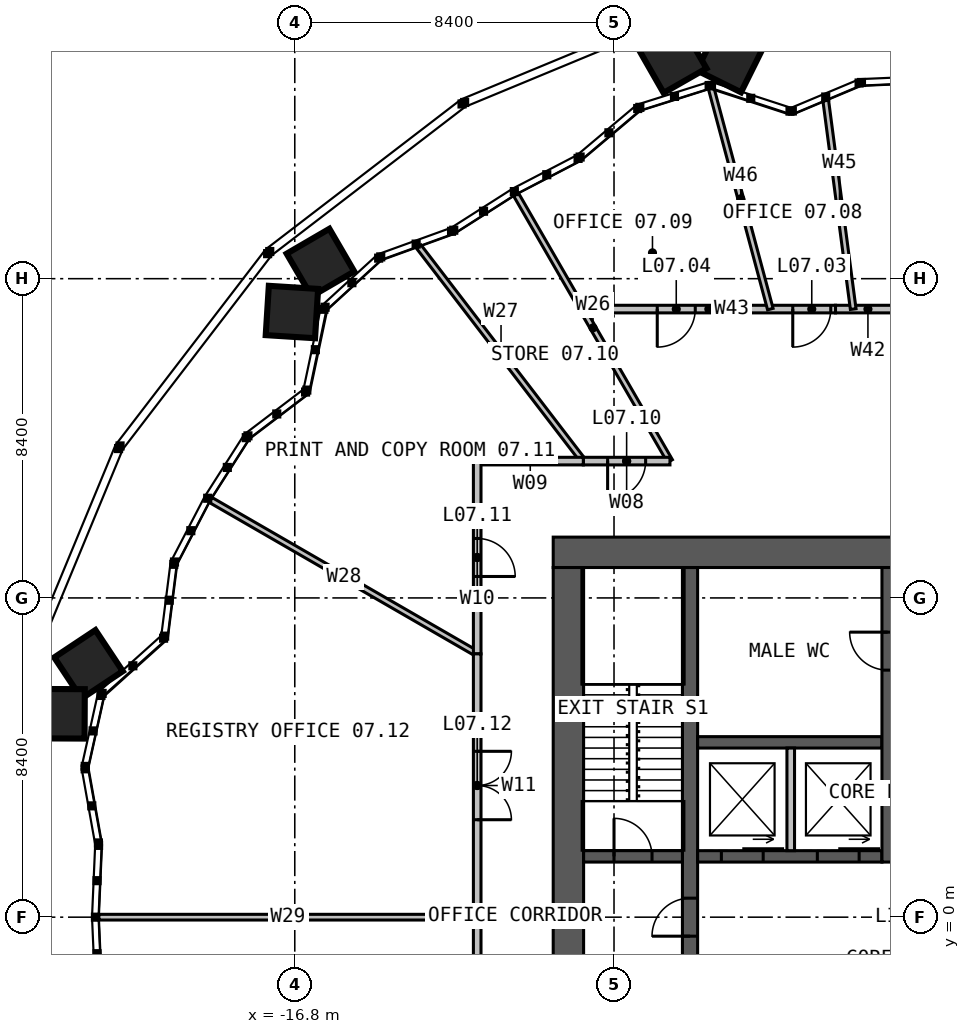
"""IFC4 building model, lengths in metres.
Left out: names, types, materials, properties, quantities, classifications, styles, units other than length and angle.
Written with IfcOpenShell. Run it as: python <this file> out.ifc"""

import sys

from ifc_helpers import new_model, si_unit, direction, frame, frame_2d, origin, place, context, subcontext, project, spatial, rectangle, extrude, element, fill, save


model = new_model("IFC4")
c1 = context("Model", 3, precision=1e-05, world=origin(), true_north=direction((0.0, 1.0)))
c2 = subcontext(c1, "Body", "Model", "MODEL_VIEW")
j1 = project(units=[si_unit("LENGTHUNIT", "METRE"), si_unit("PLANEANGLEUNIT", "RADIAN")], contexts=[c1])
p1 = place(None, origin())
s1 = spatial("IfcSite", under=j1, at=p1, CompositionType="ELEMENT")
p2 = place(p1, origin())
s2 = spatial("IfcBuilding", under=s1, at=p2, CompositionType="ELEMENT")
p3 = place(p2, frame((0.0, 0.0, 33.0)))
s3 = spatial("IfcBuildingStorey", under=s2, at=p3, CompositionType="ELEMENT", Elevation=33.0)
p4 = place(p3, frame((-10.0, 9.6, 0.0), z_axis=(0.0, 0.0, 1.0), x_axis=(1.0, 0.0, 0.0)))
e1 = element("IfcWall", 1, at=p4, inside=s3, PredefinedType="SOLIDWALL", context=c2, shape_type="SweptSolid", body=[
    extrude(rectangle(XDim=20.0, YDim=0.8, at=frame_2d((10.0, 0.0))), origin(), (0.0, 0.0, 1.0), 4.0),
])
p5 = place(p4, frame((9.4, 0.0, 0.0)))
e2 = element("IfcOpeningElement", 2, at=p5, cuts=e1, PredefinedType="OPENING", context=c2, shape_type="SweptSolid", body=[
    extrude(rectangle(XDim=1.2, YDim=2.2, at=frame_2d((0.6, 1.1))), frame((0.0, 0.41, 0.0), z_axis=(0.0, -1.0, 0.0), x_axis=(1.0, 0.0, 0.0)), (0.0, 0.0, 1.0), 0.82),
])
p6 = place(p3, frame((-9.6, 9.2, 0.0), z_axis=(0.0, 0.0, 1.0), x_axis=(0.0, -1.0, 0.0)))
e3 = element("IfcWall", 3, at=p6, inside=s3, PredefinedType="SOLIDWALL", context=c2, shape_type="SweptSolid", body=[
    extrude(rectangle(XDim=18.4, YDim=0.8, at=frame_2d((9.2, 0.0))), origin(), (0.0, 0.0, 1.0), 4.0),
])
p7 = place(p3, frame((-6.4, -9.2, 0.0), z_axis=(0.0, 0.0, 1.0), x_axis=(0.0, 1.0, 0.0)))
e4 = element("IfcWall", 4, at=p7, inside=s3, PredefinedType="SOLIDWALL", context=c2, shape_type="SweptSolid", body=[
    extrude(rectangle(XDim=18.4, YDim=0.4, at=frame_2d((9.2, 0.0))), origin(), (0.0, 0.0, 1.0), 4.0),
])
p8 = place(p7, frame((8.7, 0.0, 0.0)))
e5 = element("IfcOpeningElement", 5, at=p8, cuts=e4, PredefinedType="OPENING", context=c2, shape_type="SweptSolid", body=[
    extrude(rectangle(XDim=1.0, YDim=2.2, at=frame_2d((0.5, 1.1))), frame((0.0, 0.21, 0.0), z_axis=(0.0, -1.0, 0.0), x_axis=(1.0, 0.0, 0.0)), (0.0, 0.0, 1.0), 0.42),
])
p9 = place(p3, frame((-6.2, 1.6, 0.0), z_axis=(0.0, 0.0, 1.0), x_axis=(1.0, 0.0, 0.0)))
e6 = element("IfcWall", 6, at=p9, inside=s3, PredefinedType="SOLIDWALL", context=c2, shape_type="SweptSolid", body=[
    extrude(rectangle(XDim=4.85, YDim=0.3, at=frame_2d((2.425, 0.0))), origin(), (0.0, 0.0, 1.0), 4.0),
])
p10 = place(p9, frame((0.625, 0.0, 0.0)))
e7 = element("IfcOpeningElement", 7, at=p10, cuts=e6, PredefinedType="OPENING", context=c2, shape_type="SweptSolid", body=[
    extrude(rectangle(XDim=1.1, YDim=2.2, at=frame_2d((0.55, 1.1))), frame((0.0, 0.16, 0.0), z_axis=(0.0, -1.0, 0.0), x_axis=(1.0, 0.0, 0.0)), (0.0, 0.0, 1.0), 0.32),
])
p11 = place(p9, frame((3.15, 0.0, 0.0)))
e8 = element("IfcOpeningElement", 8, at=p11, cuts=e6, PredefinedType="OPENING", context=c2, shape_type="SweptSolid", body=[
    extrude(rectangle(XDim=1.1, YDim=2.2, at=frame_2d((0.55, 1.1))), frame((0.0, 0.16, 0.0), z_axis=(0.0, -1.0, 0.0), x_axis=(1.0, 0.0, 0.0)), (0.0, 0.0, 1.0), 0.32),
])
p12 = place(p3, frame((-6.2, 4.6, 0.0), z_axis=(0.0, 0.0, 1.0), x_axis=(1.0, 0.0, 0.0)))
e9 = element("IfcWall", 9, at=p12, inside=s3, PredefinedType="SOLIDWALL", context=c2, shape_type="SweptSolid", body=[
    extrude(rectangle(XDim=4.85, YDim=0.3, at=frame_2d((2.425, 0.0))), origin(), (0.0, 0.0, 1.0), 4.0),
])
p13 = place(p3, frame((-1.2, 1.45, 0.0), z_axis=(0.0, 0.0, 1.0), x_axis=(0.0, 1.0, 0.0)))
e10 = element("IfcWall", 10, at=p13, inside=s3, PredefinedType="SOLIDWALL", context=c2, shape_type="SweptSolid", body=[
    extrude(rectangle(XDim=7.75, YDim=0.3, at=frame_2d((3.875, 0.0))), origin(), (0.0, 0.0, 1.0), 4.0),
])
p14 = place(p13, frame((5.05, 0.0, 0.0)))
e11 = element("IfcOpeningElement", 11, at=p14, cuts=e10, PredefinedType="OPENING", context=c2, shape_type="SweptSolid", body=[
    extrude(rectangle(XDim=1.0, YDim=2.2, at=frame_2d((0.5, 1.1))), frame((0.0, 0.16, 0.0), z_axis=(0.0, -1.0, 0.0), x_axis=(1.0, 0.0, 0.0)), (0.0, 0.0, 1.0), 0.32),
])
p15 = place(p3, frame((-9.2, 1.6, 0.0), z_axis=(0.0, 0.0, 1.0), x_axis=(1.0, 0.0, 0.0)))
e12 = element("IfcWall", 12, at=p15, inside=s3, PredefinedType="SOLIDWALL", context=c2, shape_type="SweptSolid", body=[
    extrude(rectangle(XDim=2.6, YDim=0.3, at=frame_2d((1.3, 0.0))), origin(), (0.0, 0.0, 1.0), 4.0),
])
p16 = place(p15, frame((0.8, 0.0, 0.0)))
e13 = element("IfcOpeningElement", 13, at=p16, cuts=e12, PredefinedType="OPENING", context=c2, shape_type="SweptSolid", body=[
    extrude(rectangle(XDim=1.0, YDim=2.2, at=frame_2d((0.5, 1.1))), frame((0.0, 0.16, 0.0), z_axis=(0.0, -1.0, 0.0), x_axis=(1.0, 0.0, 0.0)), (0.0, 0.0, 1.0), 0.32),
])
p17 = place(p3, frame((-3.75, 1.75, 0.0), z_axis=(0.0, 0.0, 1.0), x_axis=(0.0, 1.0, 0.0)))
e14 = element("IfcWall", 14, at=p17, inside=s3, PredefinedType="SOLIDWALL", context=c2, shape_type="SweptSolid", body=[
    extrude(rectangle(XDim=2.7, YDim=0.2, at=frame_2d((1.35, 0.0))), origin(), (0.0, 0.0, 1.0), 3.75),
])
p18 = place(p3, frame((-6.928, 12.0, 0.0), z_axis=(0.0, 0.0, 1.0), x_axis=(-0.500007814618, 0.866020891966, 0.0)))
e15 = element("IfcWall", 15, at=p18, inside=s3, PredefinedType="PARTITIONING", context=c2, shape_type="SweptSolid", body=[
    extrude(rectangle(XDim=8.097, YDim=0.15, at=frame_2d((4.048, 0.0))), origin(), (0.0, 0.0, 1.0), 2.79),
])
p19 = place(p3, frame((-9.208, 12.0, 0.0), z_axis=(0.0, 0.0, 1.0), x_axis=(-0.608751461293, 0.793360988689, 0.0)))
e16 = element("IfcWall", 16, at=p19, inside=s3, PredefinedType="PARTITIONING", context=c2, shape_type="SweptSolid", body=[
    extrude(rectangle(XDim=7.112, YDim=0.15, at=frame_2d((3.556, 0.0))), origin(), (0.0, 0.0, 1.0), 2.79),
])
p20 = place(p3, frame((-12.0, 6.928, 0.0), z_axis=(0.0, 0.0, 1.0), x_axis=(-0.866020891966, 0.500007814618, 0.0)))
e17 = element("IfcWall", 17, at=p20, inside=s3, PredefinedType="PARTITIONING", context=c2, shape_type="SweptSolid", body=[
    extrude(rectangle(XDim=8.097, YDim=0.15, at=frame_2d((4.048, 0.0))), origin(), (0.0, 0.0, 1.0), 2.79),
])
p21 = place(p3, frame((-12.0, 0.0, 0.0), z_axis=(0.0, 0.0, 1.0), x_axis=(-1.0, 0.0, 0.0)))
e18 = element("IfcWall", 18, at=p21, inside=s3, PredefinedType="PARTITIONING", context=c2, shape_type="SweptSolid", body=[
    extrude(rectangle(XDim=9.954, YDim=0.15, at=frame_2d((4.977, 0.0))), origin(), (0.0, 0.0, 1.0), 2.79),
])
p22 = place(p3, frame((-0.865, 16.0, 0.0), z_axis=(0.0, 0.0, 1.0), x_axis=(-1.0, 0.0, 0.0)))
e19 = element("IfcWall", 19, at=p22, inside=s3, PredefinedType="PARTITIONING", context=c2, shape_type="SweptSolid", body=[
    extrude(rectangle(XDim=1.707, YDim=0.2, at=frame_2d((0.854, 0.0))), origin(), (0.0, 0.0, 1.0), 3.4),
])
p23 = place(p3, frame((-2.572, 16.0, 0.0), z_axis=(0.0, 0.0, 1.0), x_axis=(-1.0, 0.0, 0.0)))
e20 = element("IfcWall", 20, at=p23, inside=s3, PredefinedType="PARTITIONING", context=c2, shape_type="SweptSolid", body=[
    extrude(rectangle(XDim=6.665, YDim=0.2, at=frame_2d((3.333, 0.0))), origin(), (0.0, 0.0, 1.0), 3.8),
])
p24 = place(p23, frame((0.125, 0.0, 0.0)))
e21 = element("IfcOpeningElement", 21, at=p24, cuts=e20, PredefinedType="OPENING", context=c2, shape_type="SweptSolid", body=[
    extrude(rectangle(XDim=1.0, YDim=2.2, at=frame_2d((0.5, 1.1))), frame((0.0, 0.11, 0.0), z_axis=(0.0, -1.0, 0.0), x_axis=(1.0, 0.0, 0.0)), (0.0, 0.0, 1.0), 0.22),
])
p25 = place(p23, frame((3.69, 0.0, 0.0)))
e22 = element("IfcOpeningElement", 22, at=p25, cuts=e20, PredefinedType="OPENING", context=c2, shape_type="SweptSolid", body=[
    extrude(rectangle(XDim=1.0, YDim=2.2, at=frame_2d((0.5, 1.1))), frame((0.0, 0.11, 0.0), z_axis=(0.0, -1.0, 0.0), x_axis=(1.0, 0.0, 0.0)), (0.0, 0.0, 1.0), 0.22),
])
p26 = place(p3, frame((-2.106, 16.0, 0.0), z_axis=(0.0, 0.0, 1.0), x_axis=(-0.130538988536, 0.991443176623, 0.0)))
e23 = element("IfcWall", 23, at=p26, inside=s3, PredefinedType="PARTITIONING", context=c2, shape_type="SweptSolid", body=[
    extrude(rectangle(XDim=5.532, YDim=0.15, at=frame_2d((2.766, 0.0))), origin(), (0.0, 0.0, 1.0), 2.79),
])
p27 = place(p3, frame((-4.287, 16.0, 0.0), z_axis=(0.0, 0.0, 1.0), x_axis=(-0.258838299425, 0.965920666903, 0.0)))
e24 = element("IfcWall", 24, at=p27, inside=s3, PredefinedType="PARTITIONING", context=c2, shape_type="SweptSolid", body=[
    extrude(rectangle(XDim=6.009, YDim=0.15, at=frame_2d((3.005, 0.0))), origin(), (0.0, 0.0, 1.0), 2.79),
])
p28 = place(p3, frame((-6.928, 12.0, 0.0), z_axis=(0.0, 0.0, 1.0), x_axis=(-1.0, 0.0, 0.0)))
e25 = element("IfcWall", 25, at=p28, inside=s3, PredefinedType="PARTITIONING", context=c2, shape_type="SweptSolid", body=[
    extrude(rectangle(XDim=2.28, YDim=0.2, at=frame_2d((1.14, 0.0))), origin(), (0.0, 0.0, 1.0), 3.8),
])
p29 = place(p28, frame((0.64, 0.0, 0.0)))
e26 = element("IfcOpeningElement", 26, at=p29, cuts=e25, PredefinedType="OPENING", context=c2, shape_type="SweptSolid", body=[
    extrude(rectangle(XDim=1.0, YDim=2.2, at=frame_2d((0.5, 1.1))), frame((0.0, 0.11, 0.0), z_axis=(0.0, -1.0, 0.0), x_axis=(1.0, 0.0, 0.0)), (0.0, 0.0, 1.0), 0.22),
])
p30 = place(p3, frame((-9.208, 12.0, 0.0), z_axis=(0.0, 0.0, 1.0), x_axis=(-1.0, 0.0, 0.0)))
e27 = element("IfcWall", 27, at=p30, inside=s3, PredefinedType="PARTITIONING", context=c2, shape_type="SweptSolid", body=[
    extrude(rectangle(XDim=2.792, YDim=0.2, at=frame_2d((1.396, 0.0))), origin(), (0.0, 0.0, 1.0), 3.8),
])
p31 = place(p3, frame((-12.0, 12.0, 0.0), z_axis=(0.0, 0.0, 1.0), x_axis=(0.0, -1.0, 0.0)))
e28 = element("IfcWall", 28, at=p31, inside=s3, PredefinedType="PARTITIONING", context=c2, shape_type="SweptSolid", body=[
    extrude(rectangle(XDim=5.072, YDim=0.2, at=frame_2d((2.536, 0.0))), origin(), (0.0, 0.0, 1.0), 3.8),
])
p32 = place(p31, frame((2.036, 0.0, 0.0)))
e29 = element("IfcOpeningElement", 29, at=p32, cuts=e28, PredefinedType="OPENING", context=c2, shape_type="SweptSolid", body=[
    extrude(rectangle(XDim=1.0, YDim=2.2, at=frame_2d((0.5, 1.1))), frame((0.0, 0.11, 0.0), z_axis=(0.0, -1.0, 0.0), x_axis=(1.0, 0.0, 0.0)), (0.0, 0.0, 1.0), 0.22),
])
p33 = place(p3, frame((-12.0, 6.928, 0.0), z_axis=(0.0, 0.0, 1.0), x_axis=(0.0, -1.0, 0.0)))
e30 = element("IfcWall", 30, at=p33, inside=s3, PredefinedType="PARTITIONING", context=c2, shape_type="SweptSolid", body=[
    extrude(rectangle(XDim=6.928, YDim=0.2, at=frame_2d((3.464, 0.0))), origin(), (0.0, 0.0, 1.0), 3.8),
])
p34 = place(p33, frame((2.564, 0.0, 0.0)))
e31 = element("IfcOpeningElement", 31, at=p34, cuts=e30, PredefinedType="OPENING", context=c2, shape_type="SweptSolid", body=[
    extrude(rectangle(XDim=1.8, YDim=2.2, at=frame_2d((0.9, 1.1))), frame((0.0, 0.11, 0.0), z_axis=(0.0, -1.0, 0.0), x_axis=(1.0, 0.0, 0.0)), (0.0, 0.0, 1.0), 0.22),
])
p35 = place(p3, frame((-12.0, 0.0, 0.0), z_axis=(0.0, 0.0, 1.0), x_axis=(0.0, -1.0, 0.0)))
e32 = element("IfcWall", 32, at=p35, inside=s3, PredefinedType="PARTITIONING", context=c2, shape_type="SweptSolid", body=[
    extrude(rectangle(XDim=6.928, YDim=0.2, at=frame_2d((3.464, 0.0))), origin(), (0.0, 0.0, 1.0), 3.8),
])
p36 = place(p35, frame((2.564, 0.0, 0.0)))
e33 = element("IfcOpeningElement", 33, at=p36, cuts=e32, PredefinedType="OPENING", context=c2, shape_type="SweptSolid", body=[
    extrude(rectangle(XDim=1.8, YDim=2.2, at=frame_2d((0.9, 1.1))), frame((0.0, 0.11, 0.0), z_axis=(0.0, -1.0, 0.0), x_axis=(1.0, 0.0, 0.0)), (0.0, 0.0, 1.0), 0.22),
])
p37 = place(p8, origin())
e34 = element("IfcDoor", 34, at=p37, inside=s3, OperationType="SINGLE_SWING_LEFT", PredefinedType="DOOR", context=c2, shape_type="SweptSolid", body=[
    extrude(rectangle(XDim=1.0, YDim=2.2, at=frame_2d((0.5, 1.1))), frame((0.0, 0.025, 0.0), z_axis=(0.0, -1.0, 0.0), x_axis=(1.0, 0.0, 0.0)), (0.0, 0.0, 1.0), 0.05),
])
fill(e5, e34)
p38 = place(p16, origin())
e35 = element("IfcDoor", 35, at=p38, inside=s3, OperationType="SINGLE_SWING_LEFT", PredefinedType="DOOR", context=c2, shape_type="SweptSolid", body=[
    extrude(rectangle(XDim=1.0, YDim=2.2, at=frame_2d((0.5, 1.1))), frame((0.0, 0.025, 0.0), z_axis=(0.0, -1.0, 0.0), x_axis=(1.0, 0.0, 0.0)), (0.0, 0.0, 1.0), 0.05),
])
fill(e13, e35)
p39 = place(p14, origin())
e36 = element("IfcDoor", 36, at=p39, inside=s3, OperationType="SINGLE_SWING_RIGHT", PredefinedType="DOOR", context=c2, shape_type="SweptSolid", body=[
    extrude(rectangle(XDim=1.0, YDim=2.2, at=frame_2d((0.5, 1.1))), frame((0.0, 0.025, 0.0), z_axis=(0.0, -1.0, 0.0), x_axis=(1.0, 0.0, 0.0)), (0.0, 0.0, 1.0), 0.05),
])
fill(e11, e36)
p40 = place(p10, origin())
e37 = element("IfcDoor", 37, at=p40, inside=s3, OperationType="SLIDING_TO_LEFT", PredefinedType="DOOR", context=c2, shape_type="SweptSolid", body=[
    extrude(rectangle(XDim=1.1, YDim=2.2, at=frame_2d((0.55, 1.1))), frame((0.0, 0.025, 0.0), z_axis=(0.0, -1.0, 0.0), x_axis=(1.0, 0.0, 0.0)), (0.0, 0.0, 1.0), 0.05),
])
fill(e7, e37)
p41 = place(p11, origin())
e38 = element("IfcDoor", 38, at=p41, inside=s3, OperationType="SLIDING_TO_LEFT", PredefinedType="DOOR", context=c2, shape_type="SweptSolid", body=[
    extrude(rectangle(XDim=1.1, YDim=2.2, at=frame_2d((0.55, 1.1))), frame((0.0, 0.025, 0.0), z_axis=(0.0, -1.0, 0.0), x_axis=(1.0, 0.0, 0.0)), (0.0, 0.0, 1.0), 0.05),
])
fill(e8, e38)
p42 = place(p24, origin())
e39 = element("IfcDoor", 39, at=p42, inside=s3, OperationType="SINGLE_SWING_RIGHT", PredefinedType="DOOR", context=c2, shape_type="SweptSolid", body=[
    extrude(rectangle(XDim=1.0, YDim=2.2, at=frame_2d((0.5, 1.1))), frame((0.0, 0.025, 0.0), z_axis=(0.0, -1.0, 0.0), x_axis=(1.0, 0.0, 0.0)), (0.0, 0.0, 1.0), 0.05),
])
fill(e21, e39)
p43 = place(p25, origin())
e40 = element("IfcDoor", 40, at=p43, inside=s3, OperationType="SINGLE_SWING_RIGHT", PredefinedType="DOOR", context=c2, shape_type="SweptSolid", body=[
    extrude(rectangle(XDim=1.0, YDim=2.2, at=frame_2d((0.5, 1.1))), frame((0.0, 0.025, 0.0), z_axis=(0.0, -1.0, 0.0), x_axis=(1.0, 0.0, 0.0)), (0.0, 0.0, 1.0), 0.05),
])
fill(e22, e40)
p44 = place(p29, origin())
e41 = element("IfcDoor", 41, at=p44, inside=s3, OperationType="SINGLE_SWING_RIGHT", PredefinedType="DOOR", context=c2, shape_type="SweptSolid", body=[
    extrude(rectangle(XDim=1.0, YDim=2.2, at=frame_2d((0.5, 1.1))), frame((0.0, 0.025, 0.0), z_axis=(0.0, -1.0, 0.0), x_axis=(1.0, 0.0, 0.0)), (0.0, 0.0, 1.0), 0.05),
])
fill(e26, e41)
p45 = place(p32, origin())
e42 = element("IfcDoor", 42, at=p45, inside=s3, OperationType="SINGLE_SWING_RIGHT", PredefinedType="DOOR", context=c2, shape_type="SweptSolid", body=[
    extrude(rectangle(XDim=1.0, YDim=2.2, at=frame_2d((0.5, 1.1))), frame((0.0, 0.025, 0.0), z_axis=(0.0, -1.0, 0.0), x_axis=(1.0, 0.0, 0.0)), (0.0, 0.0, 1.0), 0.05),
])
fill(e29, e42)
p46 = place(p34, origin())
e43 = element("IfcDoor", 43, at=p46, inside=s3, OperationType="DOUBLE_DOOR_SINGLE_SWING", PredefinedType="DOOR", context=c2, shape_type="SweptSolid", body=[
    extrude(rectangle(XDim=1.8, YDim=2.2, at=frame_2d((0.9, 1.1))), frame((0.0, 0.025, 0.0), z_axis=(0.0, -1.0, 0.0), x_axis=(1.0, 0.0, 0.0)), (0.0, 0.0, 1.0), 0.05),
])
fill(e31, e43)
save(model, sys.argv[1])
